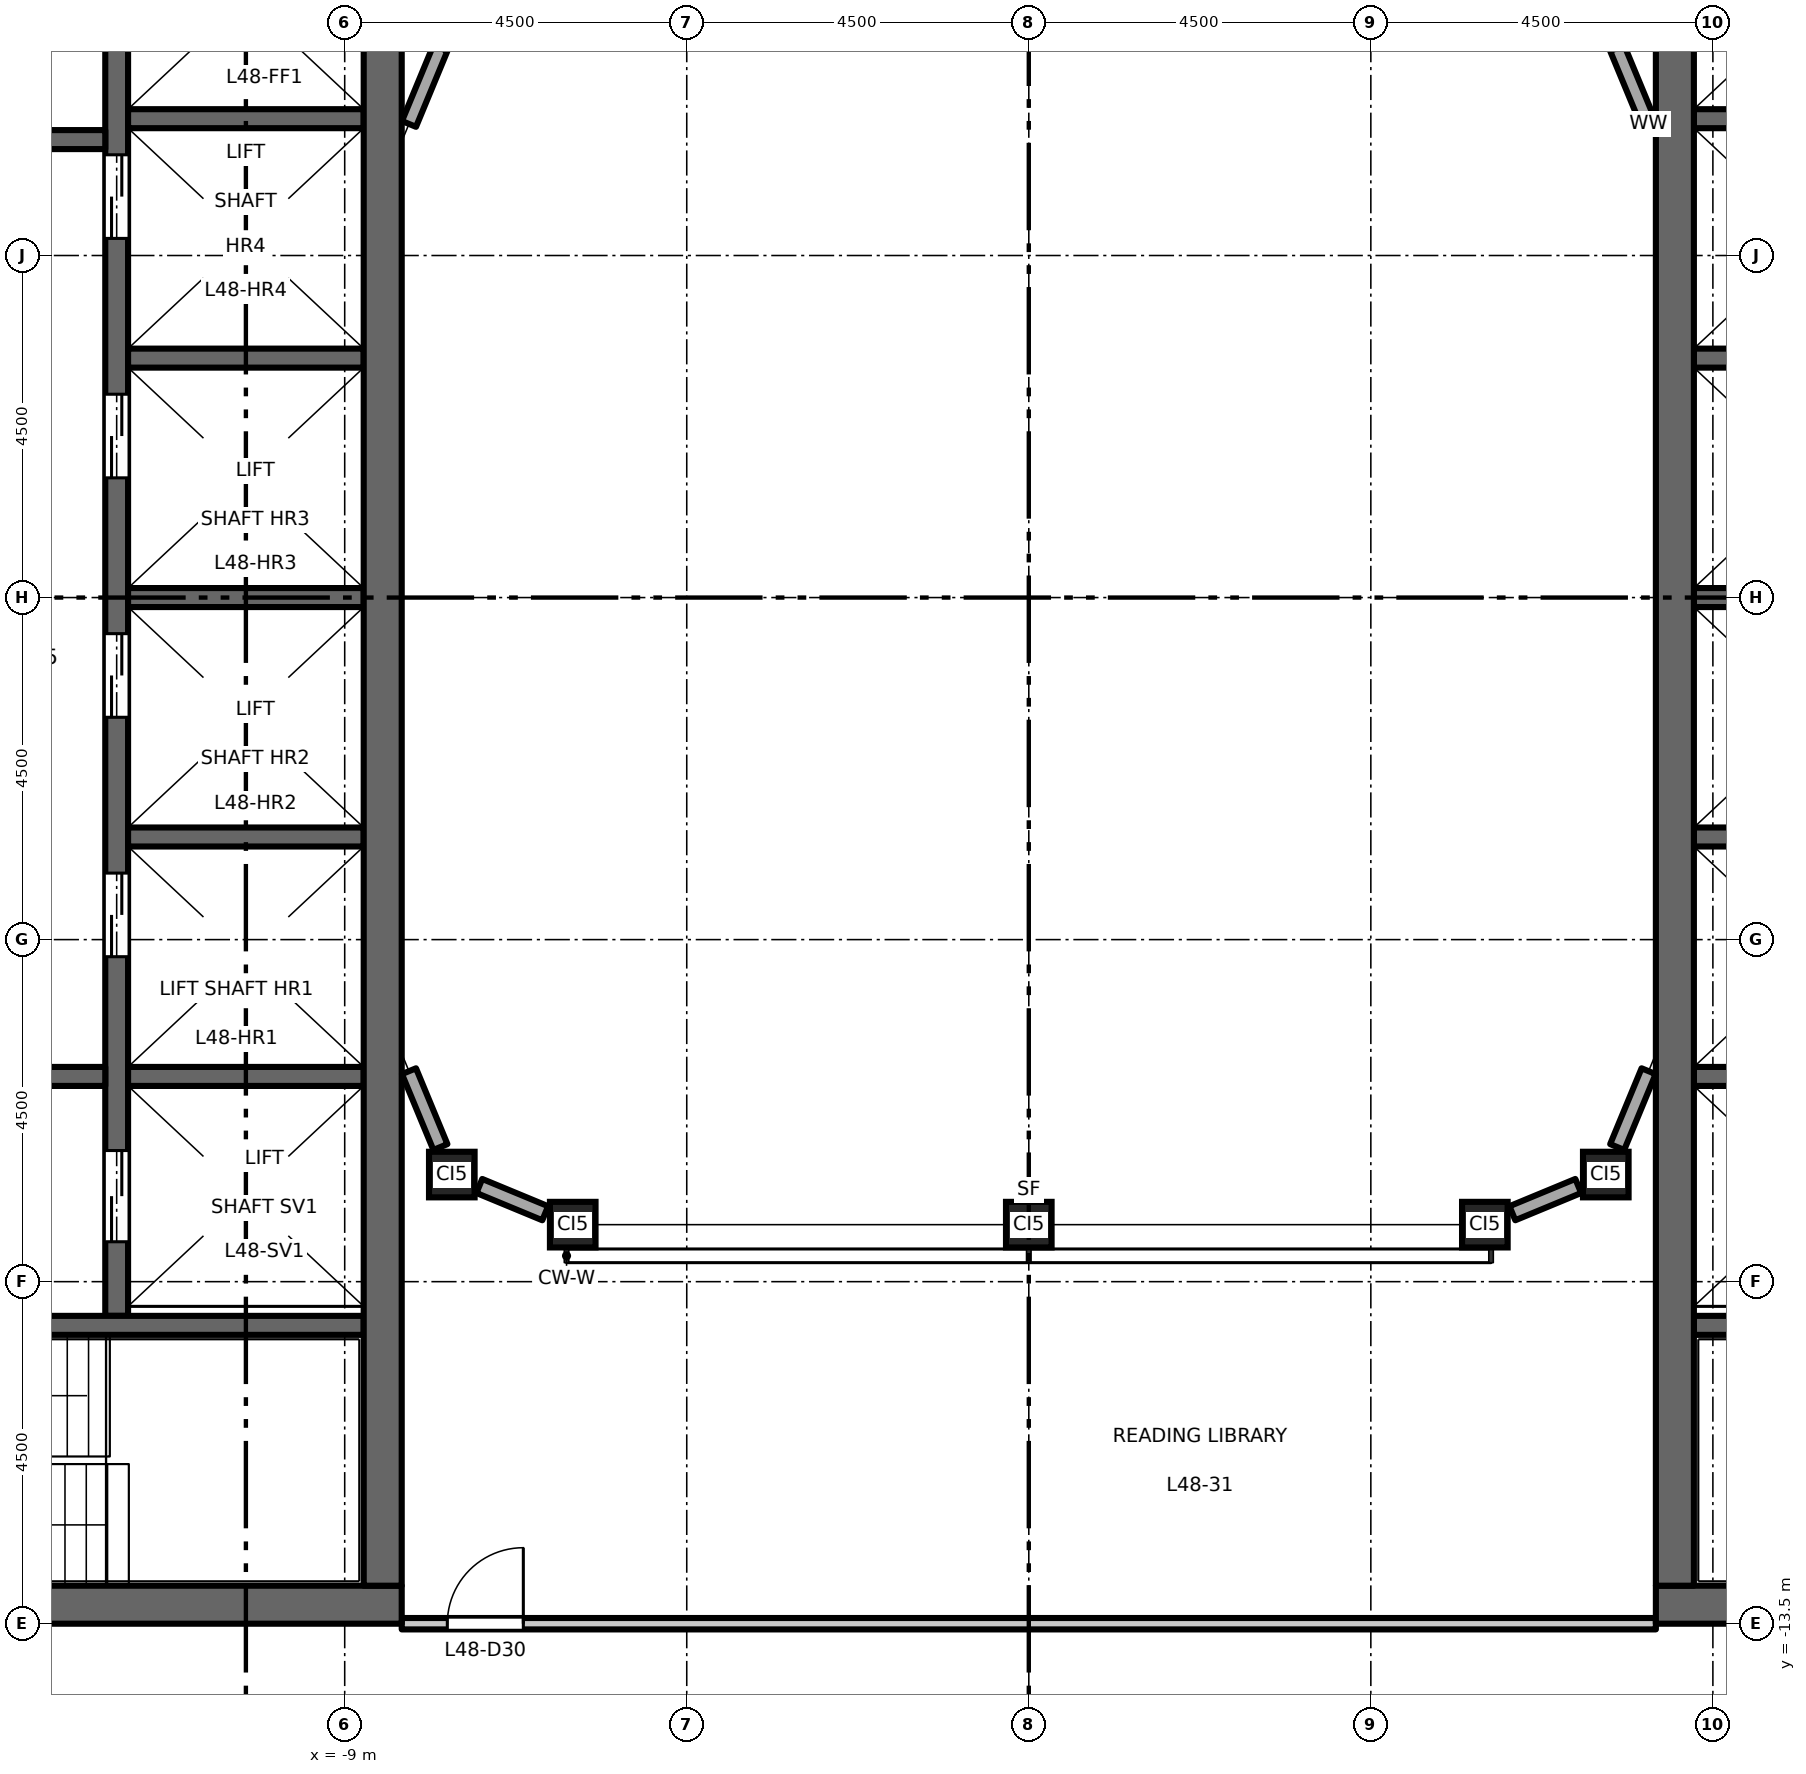
"""IFC4 building model, lengths in metres.
Left out: names, types, materials, properties, quantities, classifications, styles, units other than length and angle.
Written with IfcOpenShell. Run it as: python <this file> out.ifc"""

import sys

from ifc_helpers import new_model, si_unit, direction, frame, frame_2d, origin, origin_2d, place, context, subcontext, project, spatial, rectangle, hollow_rectangle, extrude, element, fill, save


model = new_model("IFC4")
c1 = context("Model", 3, precision=1e-05, world=origin(), true_north=direction((0.0, 1.0)))
c2 = subcontext(c1, "Body", "Model", "MODEL_VIEW")
j1 = project(units=[si_unit("LENGTHUNIT", "METRE"), si_unit("PLANEANGLEUNIT", "RADIAN")], contexts=[c1])
p1 = place(None, origin())
s1 = spatial("IfcSite", under=j1, at=p1, CompositionType="ELEMENT")
p2 = place(p1, origin())
s2 = spatial("IfcBuilding", under=s1, at=p2, CompositionType="ELEMENT")
p3 = place(p2, frame((0.0, 0.0, 224.2)))
s3 = spatial("IfcBuildingStorey", under=s2, at=p3, CompositionType="ELEMENT", Elevation=224.2)
for number, where, z_axis, x_axis in (
    (1, (-7.591, -7.591, 0.0), (0.0, 0.0, 1.0), (1.0, 0.0, 0.0)),
    (2, (-6.0, -8.25, 0.0), (0.0, 0.0, 1.0), (1.0, 0.0, 0.0)),
    (3, (0.0, -8.25, 0.0), (0.0, 0.0, 1.0), (1.0, 0.0, 0.0)),
    (4, (6.0, -8.25, 0.0), (0.0, 0.0, 1.0), (1.0, 0.0, 0.0)),
    (5, (7.591, -7.591, 0.0), (0.0, 0.0, 1.0), (1.0, 0.0, 0.0)),
):
    element("IfcColumn", number, at=place(p3, frame(where, z_axis=z_axis, x_axis=x_axis)), inside=s3, PredefinedType="COLUMN", context=c2, shape_type="SweptSolid", body=[
        extrude(hollow_rectangle(XDim=0.6, YDim=0.6, WallThickness=0.032, at=origin_2d()), origin(), (0.0, 0.0, 1.0), 4.5),
    ])
p4 = place(p3, frame((-12.0, -9.45, 0.0), z_axis=(0.0, 0.0, 1.0), x_axis=(0.0, 1.0, 0.0)))
e6 = element("IfcWall", 6, at=p4, inside=s3, PredefinedType="SHEAR", context=c2, shape_type="SweptSolid", body=[
    extrude(rectangle(XDim=18.9, YDim=0.3, at=frame_2d((9.45, 0.0))), origin(), (0.0, 0.0, 1.0), 4.35),
])
p5 = place(p4, frame((4.725, 0.0, 0.0)))
e7 = element("IfcOpeningElement", 7, at=p5, cuts=e6, PredefinedType="OPENING", context=c2, shape_type="SweptSolid", body=[
    extrude(rectangle(XDim=1.1, YDim=2.1, at=frame_2d((0.55, 1.05))), frame((0.0, 0.16, 0.0), z_axis=(0.0, -1.0, 0.0), x_axis=(1.0, 0.0, 0.0)), (0.0, 0.0, 1.0), 0.32),
])
p6 = place(p4, frame((7.875, 0.0, 0.0)))
e8 = element("IfcOpeningElement", 8, at=p6, cuts=e6, PredefinedType="OPENING", context=c2, shape_type="SweptSolid", body=[
    extrude(rectangle(XDim=1.1, YDim=2.1, at=frame_2d((0.55, 1.05))), frame((0.0, 0.16, 0.0), z_axis=(0.0, -1.0, 0.0), x_axis=(1.0, 0.0, 0.0)), (0.0, 0.0, 1.0), 0.32),
])
p7 = place(p4, frame((11.025, 0.0, 0.0)))
e9 = element("IfcOpeningElement", 9, at=p7, cuts=e6, PredefinedType="OPENING", context=c2, shape_type="SweptSolid", body=[
    extrude(rectangle(XDim=1.1, YDim=2.1, at=frame_2d((0.55, 1.05))), frame((0.0, 0.16, 0.0), z_axis=(0.0, -1.0, 0.0), x_axis=(1.0, 0.0, 0.0)), (0.0, 0.0, 1.0), 0.32),
])
p8 = place(p4, frame((14.175, 0.0, 0.0)))
e10 = element("IfcOpeningElement", 10, at=p8, cuts=e6, PredefinedType="OPENING", context=c2, shape_type="SweptSolid", body=[
    extrude(rectangle(XDim=1.1, YDim=2.1, at=frame_2d((0.55, 1.05))), frame((0.0, 0.16, 0.0), z_axis=(0.0, -1.0, 0.0), x_axis=(1.0, 0.0, 0.0)), (0.0, 0.0, 1.0), 0.32),
])
p9 = place(p4, frame((16.725, 0.0, 0.0)))
e11 = element("IfcOpeningElement", 11, at=p9, cuts=e6, PredefinedType="OPENING", context=c2, shape_type="SweptSolid", body=[
    extrude(rectangle(XDim=1.2, YDim=2.1, at=frame_2d((0.6, 1.05))), frame((0.0, 0.16, 0.0), z_axis=(0.0, -1.0, 0.0), x_axis=(1.0, 0.0, 0.0)), (0.0, 0.0, 1.0), 0.32),
])
p10 = place(p4, frame((0.975, 0.0, 0.0)))
e12 = element("IfcOpeningElement", 12, at=p10, cuts=e6, PredefinedType="OPENING", context=c2, shape_type="SweptSolid", body=[
    extrude(rectangle(XDim=1.2, YDim=2.1, at=frame_2d((0.6, 1.05))), frame((0.0, 0.16, 0.0), z_axis=(0.0, -1.0, 0.0), x_axis=(1.0, 0.0, 0.0)), (0.0, 0.0, 1.0), 0.32),
])
p11 = place(p3, frame((-12.15, 6.025, 0.0), z_axis=(0.0, 0.0, 1.0), x_axis=(-1.0, 0.0, 0.0)))
e13 = element("IfcWall", 13, at=p11, inside=s3, PredefinedType="SHEAR", context=c2, shape_type="SweptSolid", body=[
    extrude(rectangle(XDim=4.6, YDim=0.25, at=frame_2d((2.3, 0.0))), origin(), (0.0, 0.0, 1.0), 4.35),
])
p12 = place(p11, frame((1.8, 0.0, 0.0)))
e14 = element("IfcOpeningElement", 14, at=p12, cuts=e13, PredefinedType="OPENING", context=c2, shape_type="SweptSolid", body=[
    extrude(rectangle(XDim=1.0, YDim=2.1, at=frame_2d((0.5, 1.05))), frame((0.0, 0.135, 0.0), z_axis=(0.0, -1.0, 0.0), x_axis=(1.0, 0.0, 0.0)), (0.0, 0.0, 1.0), 0.27),
])
p13 = place(p3, frame((-12.15, -6.3, 0.0), z_axis=(0.0, 0.0, 1.0), x_axis=(-1.0, 0.0, 0.0)))
e15 = element("IfcWall", 15, at=p13, inside=s3, PredefinedType="SHEAR", context=c2, shape_type="SweptSolid", body=[
    extrude(rectangle(XDim=9.1, YDim=0.25, at=frame_2d((4.55, 0.0))), origin(), (0.0, 0.0, 1.0), 4.35),
])
p14 = place(p13, frame((1.8, 0.0, 0.0)))
e16 = element("IfcOpeningElement", 16, at=p14, cuts=e15, PredefinedType="OPENING", context=c2, shape_type="SweptSolid", body=[
    extrude(rectangle(XDim=1.0, YDim=2.1, at=frame_2d((0.5, 1.05))), frame((0.0, 0.135, 0.0), z_axis=(0.0, -1.0, 0.0), x_axis=(1.0, 0.0, 0.0)), (0.0, 0.0, 1.0), 0.27),
])
for number, where, z_axis, x_axis in (
    (17, (-8.75, 0.0, 0.0), (0.0, 0.0, 1.0), (-1.0, 0.0, 0.0)),
    (18, (-8.75, 3.15, 0.0), (0.0, 0.0, 1.0), (-1.0, 0.0, 0.0)),
    (19, (-8.75, 6.3, 0.0), (0.0, 0.0, 1.0), (-1.0, 0.0, 0.0)),
    (20, (-8.75, -3.15, 0.0), (0.0, 0.0, 1.0), (-1.0, 0.0, 0.0)),
    (21, (-8.75, -6.3, 0.0), (0.0, 0.0, 1.0), (-1.0, 0.0, 0.0)),
):
    element("IfcWall", number, at=place(p3, frame(where, z_axis=z_axis, x_axis=x_axis)), inside=s3, PredefinedType="SHEAR", context=c2, shape_type="SweptSolid", body=[
        extrude(rectangle(XDim=3.1, YDim=0.25, at=frame_2d((1.55, 0.0))), origin(), (0.0, 0.0, 1.0), 4.35),
    ])
p15 = place(p3, frame((-8.75, -9.575, 0.0), z_axis=(0.0, 0.0, 1.0), x_axis=(-1.0, 0.0, 0.0)))
e22 = element("IfcWall", 22, at=p15, inside=s3, PredefinedType="SHEAR", context=c2, shape_type="SweptSolid", body=[
    extrude(rectangle(XDim=8.0, YDim=0.25, at=frame_2d((4.0, 0.0))), origin(), (0.0, 0.0, 1.0), 4.35),
])
p16 = place(p15, frame((6.65, 0.0, 0.0)))
e23 = element("IfcOpeningElement", 23, at=p16, cuts=e22, PredefinedType="OPENING", context=c2, shape_type="SweptSolid", body=[
    extrude(rectangle(XDim=1.1, YDim=2.1, at=frame_2d((0.55, 1.05))), frame((0.0, 0.135, 0.0), z_axis=(0.0, -1.0, 0.0), x_axis=(1.0, 0.0, 0.0)), (0.0, 0.0, 1.0), 0.27),
])
p17 = place(p3, frame((-8.25, -13.25, 0.0), z_axis=(0.0, 0.0, 1.0), x_axis=(-1.0, 0.0, 0.0)))
e24 = element("IfcWall", 24, at=p17, inside=s3, PredefinedType="SHEAR", context=c2, shape_type="SweptSolid", body=[
    extrude(rectangle(XDim=13.5, YDim=0.5, at=frame_2d((6.75, 0.0))), origin(), (0.0, 0.0, 1.0), 4.35),
])
p18 = place(p3, frame((-8.5, -13.0, 0.0), z_axis=(0.0, 0.0, 1.0), x_axis=(0.0, 1.0, 0.0)))
e25 = element("IfcWall", 25, at=p18, inside=s3, PredefinedType="SHEAR", context=c2, shape_type="SweptSolid", body=[
    extrude(rectangle(XDim=26.0, YDim=0.5, at=frame_2d((13.0, 0.0))), origin(), (0.0, 0.0, 1.0), 4.35),
])
for number, where, z_axis, x_axis in (
    (26, (8.75, 0.0, 0.0), (0.0, 0.0, 1.0), (1.0, 0.0, 0.0)),
    (27, (8.75, 3.15, 0.0), (0.0, 0.0, 1.0), (1.0, 0.0, 0.0)),
    (28, (8.75, 6.3, 0.0), (0.0, 0.0, 1.0), (1.0, 0.0, 0.0)),
    (29, (8.75, -3.15, 0.0), (0.0, 0.0, 1.0), (1.0, 0.0, 0.0)),
    (30, (8.75, -6.3, 0.0), (0.0, 0.0, 1.0), (1.0, 0.0, 0.0)),
):
    element("IfcWall", number, at=place(p3, frame(where, z_axis=z_axis, x_axis=x_axis)), inside=s3, PredefinedType="SHEAR", context=c2, shape_type="SweptSolid", body=[
        extrude(rectangle(XDim=3.1, YDim=0.25, at=frame_2d((1.55, 0.0))), origin(), (0.0, 0.0, 1.0), 4.35),
    ])
p19 = place(p3, frame((8.75, -9.575, 0.0), z_axis=(0.0, 0.0, 1.0), x_axis=(1.0, 0.0, 0.0)))
e31 = element("IfcWall", 31, at=p19, inside=s3, PredefinedType="SHEAR", context=c2, shape_type="SweptSolid", body=[
    extrude(rectangle(XDim=8.0, YDim=0.25, at=frame_2d((4.0, 0.0))), origin(), (0.0, 0.0, 1.0), 4.35),
])
p20 = place(p19, frame((6.65, 0.0, 0.0)))
e32 = element("IfcOpeningElement", 32, at=p20, cuts=e31, PredefinedType="OPENING", context=c2, shape_type="SweptSolid", body=[
    extrude(rectangle(XDim=1.1, YDim=2.1, at=frame_2d((0.55, 1.05))), frame((0.0, 0.135, 0.0), z_axis=(0.0, -1.0, 0.0), x_axis=(1.0, 0.0, 0.0)), (0.0, 0.0, 1.0), 0.27),
])
p21 = place(p3, frame((8.25, -13.25, 0.0), z_axis=(0.0, 0.0, 1.0), x_axis=(1.0, 0.0, 0.0)))
e33 = element("IfcWall", 33, at=p21, inside=s3, PredefinedType="SHEAR", context=c2, shape_type="SweptSolid", body=[
    extrude(rectangle(XDim=13.5, YDim=0.5, at=frame_2d((6.75, 0.0))), origin(), (0.0, 0.0, 1.0), 4.35),
])
p22 = place(p3, frame((8.5, -13.0, 0.0), z_axis=(0.0, 0.0, 1.0), x_axis=(0.0, 1.0, 0.0)))
e34 = element("IfcWall", 34, at=p22, inside=s3, PredefinedType="SHEAR", context=c2, shape_type="SweptSolid", body=[
    extrude(rectangle(XDim=26.0, YDim=0.5, at=frame_2d((13.0, 0.0))), origin(), (0.0, 0.0, 1.0), 4.35),
])
p23 = place(p3, frame((6.362, -8.1, 0.0), z_axis=(0.0, 0.0, 1.0), x_axis=(0.923829670615, 0.382803787458, 0.0)))
e35 = element("IfcWall", 35, at=p23, inside=s3, PredefinedType="STANDARD", context=c2, shape_type="SweptSolid", body=[
    extrude(rectangle(XDim=0.938, YDim=0.2, at=frame_2d((0.469, 0.0))), origin(), (0.0, 0.0, 1.0), 3.918),
])
for number, where, z_axis, x_axis in (
    (36, (7.741, -7.229, 0.0), (0.0, 0.0, 1.0), (0.383, 0.924, 0.0)),
    (37, (8.154, 6.231, 0.0), (0.0, 0.0, 1.0), (-0.383, 0.924, 0.0)),
    (38, (-7.741, 7.229, 0.0), (0.0, 0.0, 1.0), (-0.383, -0.924, 0.0)),
    (39, (-8.154, -6.231, 0.0), (0.0, 0.0, 1.0), (0.383, -0.924, 0.0)),
):
    element("IfcWall", number, at=place(p3, frame(where, z_axis=z_axis, x_axis=x_axis)), inside=s3, PredefinedType="STANDARD", context=c2, shape_type="SweptSolid", body=[
        extrude(rectangle(XDim=1.08, YDim=0.2, at=frame_2d((0.54, 0.0))), origin(), (0.0, 0.0, 1.0), 3.918),
    ])
p24 = place(p3, frame((-7.229, -7.741, 0.0), z_axis=(0.0, 0.0, 1.0), x_axis=(0.923829670615, -0.382803787458, 0.0)))
e40 = element("IfcWall", 40, at=p24, inside=s3, PredefinedType="STANDARD", context=c2, shape_type="SweptSolid", body=[
    extrude(rectangle(XDim=0.938, YDim=0.2, at=frame_2d((0.469, 0.0))), origin(), (0.0, 0.0, 1.0), 3.918),
])
p25 = place(p3, frame((-8.25, -13.5, 0.0), z_axis=(0.0, 0.0, 1.0), x_axis=(1.0, 0.0, 0.0)))
e41 = element("IfcWall", 41, at=p25, inside=s3, PredefinedType="PARTITIONING", context=c2, shape_type="SweptSolid", body=[
    extrude(rectangle(XDim=16.5, YDim=0.15, at=frame_2d((8.25, 0.0))), origin(), (0.0, 0.0, 1.0), 3.95),
])
p26 = place(p25, frame((0.6, 0.0, 0.0)))
e42 = element("IfcOpeningElement", 42, at=p26, cuts=e41, PredefinedType="OPENING", context=c2, shape_type="SweptSolid", body=[
    extrude(rectangle(XDim=1.0, YDim=2.1, at=frame_2d((0.5, 1.05))), frame((0.0, 0.085, 0.0), z_axis=(0.0, -1.0, 0.0), x_axis=(1.0, 0.0, 0.0)), (0.0, 0.0, 1.0), 0.17),
])
p27 = place(p5, origin())
e43 = element("IfcDoor", 43, at=p27, inside=s3, OperationType="DOUBLE_DOOR_SLIDING", PredefinedType="DOOR", context=c2, shape_type="SweptSolid", body=[
    extrude(rectangle(XDim=1.1, YDim=2.1, at=frame_2d((0.55, 1.05))), frame((0.0, 0.025, 0.0), z_axis=(0.0, -1.0, 0.0), x_axis=(1.0, 0.0, 0.0)), (0.0, 0.0, 1.0), 0.05),
])
fill(e7, e43)
p28 = place(p6, origin())
e44 = element("IfcDoor", 44, at=p28, inside=s3, OperationType="DOUBLE_DOOR_SLIDING", PredefinedType="DOOR", context=c2, shape_type="SweptSolid", body=[
    extrude(rectangle(XDim=1.1, YDim=2.1, at=frame_2d((0.55, 1.05))), frame((0.0, 0.025, 0.0), z_axis=(0.0, -1.0, 0.0), x_axis=(1.0, 0.0, 0.0)), (0.0, 0.0, 1.0), 0.05),
])
fill(e8, e44)
p29 = place(p7, origin())
e45 = element("IfcDoor", 45, at=p29, inside=s3, OperationType="DOUBLE_DOOR_SLIDING", PredefinedType="DOOR", context=c2, shape_type="SweptSolid", body=[
    extrude(rectangle(XDim=1.1, YDim=2.1, at=frame_2d((0.55, 1.05))), frame((0.0, 0.025, 0.0), z_axis=(0.0, -1.0, 0.0), x_axis=(1.0, 0.0, 0.0)), (0.0, 0.0, 1.0), 0.05),
])
fill(e9, e45)
p30 = place(p8, origin())
e46 = element("IfcDoor", 46, at=p30, inside=s3, OperationType="DOUBLE_DOOR_SLIDING", PredefinedType="DOOR", context=c2, shape_type="SweptSolid", body=[
    extrude(rectangle(XDim=1.1, YDim=2.1, at=frame_2d((0.55, 1.05))), frame((0.0, 0.025, 0.0), z_axis=(0.0, -1.0, 0.0), x_axis=(1.0, 0.0, 0.0)), (0.0, 0.0, 1.0), 0.05),
])
fill(e10, e46)
p31 = place(p10, origin())
e47 = element("IfcDoor", 47, at=p31, inside=s3, OperationType="DOUBLE_DOOR_SLIDING", PredefinedType="DOOR", context=c2, shape_type="SweptSolid", body=[
    extrude(rectangle(XDim=1.2, YDim=2.1, at=frame_2d((0.6, 1.05))), frame((0.0, 0.025, 0.0), z_axis=(0.0, -1.0, 0.0), x_axis=(1.0, 0.0, 0.0)), (0.0, 0.0, 1.0), 0.05),
])
fill(e12, e47)
p32 = place(p26, origin())
e48 = element("IfcDoor", 48, at=p32, inside=s3, OperationType="SINGLE_SWING_RIGHT", PredefinedType="DOOR", context=c2, shape_type="SweptSolid", body=[
    extrude(rectangle(XDim=1.0, YDim=2.1, at=frame_2d((0.5, 1.05))), frame((0.0, 0.025, 0.0), z_axis=(0.0, -1.0, 0.0), x_axis=(1.0, 0.0, 0.0)), (0.0, 0.0, 1.0), 0.05),
])
fill(e42, e48)
save(model, sys.argv[1])
